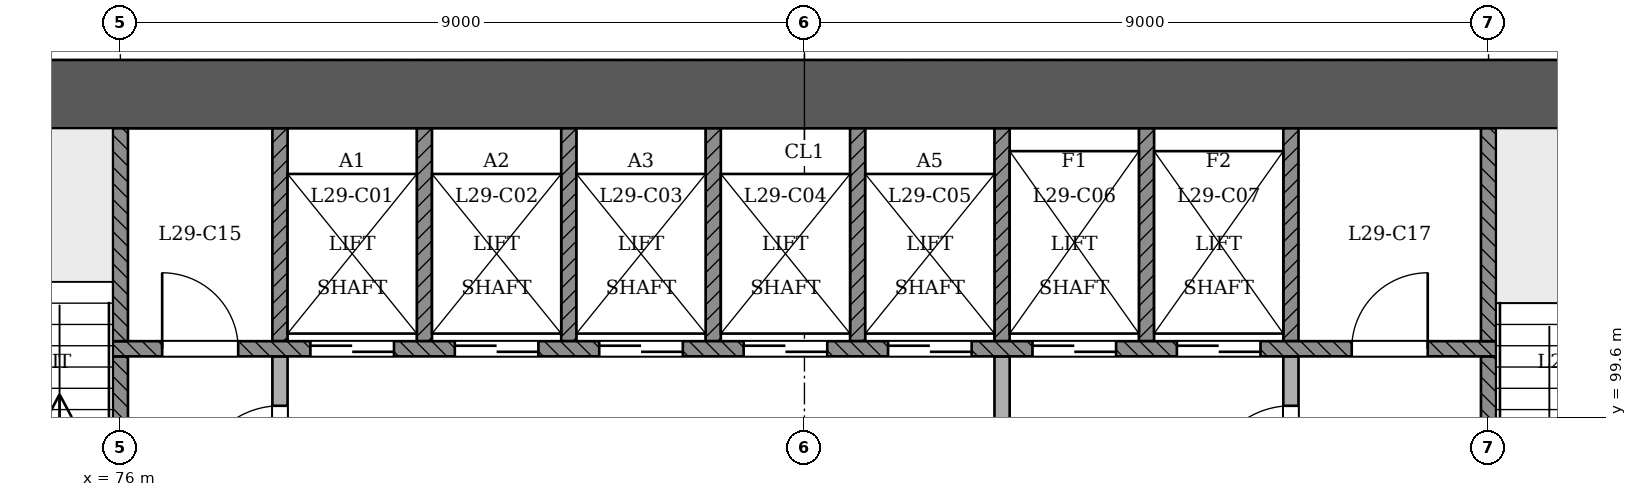
"""IFC4 building model, lengths in metres.
Left out: names, types, materials, properties, quantities, classifications, styles, units other than length and angle.
Written with IfcOpenShell. Run it as: python <this file> out.ifc"""

import sys

from ifc_helpers import new_model, si_unit, direction, frame, frame_2d, origin, place, context, subcontext, project, spatial, rectangle, extrude, element, fill, save


model = new_model("IFC4")
c1 = context("Model", 3, precision=1e-05, world=origin(), true_north=direction((0.0, 1.0)))
c2 = subcontext(c1, "Body", "Model", "MODEL_VIEW")
j1 = project(units=[si_unit("LENGTHUNIT", "METRE"), si_unit("PLANEANGLEUNIT", "RADIAN")], contexts=[c1])
p1 = place(None, origin())
s1 = spatial("IfcSite", under=j1, at=p1, CompositionType="ELEMENT")
p2 = place(p1, origin())
s2 = spatial("IfcBuilding", under=s1, at=p2, CompositionType="ELEMENT")
p3 = place(p2, frame((0.0, 0.0, 115.2)))
s3 = spatial("IfcBuildingStorey", under=s2, at=p3, CompositionType="ELEMENT", Elevation=115.2)
p4 = place(p3, frame((97.45, 103.85, 0.0), z_axis=(0.0, 0.0, 1.0), x_axis=(-1.0, 0.0, 0.0)))
e1 = element("IfcWall", 1, at=p4, inside=s3, PredefinedType="SHEAR", context=c2, shape_type="SweptSolid", body=[
    extrude(rectangle(XDim=25.35, YDim=0.9, at=frame_2d((12.675, 0.0))), origin(), (0.0, 0.0, 1.0), 3.6),
])
p5 = place(p3, frame((87.6, 93.4, 0.0), z_axis=(0.0, 0.0, 1.0), x_axis=(0.0, 1.0, 0.0)))
e2 = element("IfcWall", 2, at=p5, inside=s3, PredefinedType="PARTITIONING", context=c2, shape_type="SweptSolid", body=[
    extrude(rectangle(XDim=7.0, YDim=0.2, at=frame_2d((3.5, 0.0))), origin(), (0.0, 0.0, 1.0), 3.15),
])
p6 = place(p5, frame((4.45, 0.0, 0.0)))
e3 = element("IfcOpeningElement", 3, at=p6, cuts=e2, PredefinedType="OPENING", context=c2, shape_type="SweptSolid", body=[
    extrude(rectangle(XDim=1.1, YDim=2.1, at=frame_2d((0.55, 1.05))), frame((0.0, 0.11, 0.0), z_axis=(0.0, -1.0, 0.0), x_axis=(1.0, 0.0, 0.0)), (0.0, 0.0, 1.0), 0.221),
])
p7 = place(p3, frame((91.4, 96.2, 0.0), z_axis=(0.0, 0.0, 1.0), x_axis=(0.0, 1.0, 0.0)))
e4 = element("IfcWall", 4, at=p7, inside=s3, PredefinedType="PARTITIONING", context=c2, shape_type="SweptSolid", body=[
    extrude(rectangle(XDim=4.2, YDim=0.2, at=frame_2d((2.1, 0.0))), origin(), (0.0, 0.0, 1.0), 3.15),
])
p8 = place(p7, frame((2.45, 0.0, 0.0)))
e5 = element("IfcOpeningElement", 5, at=p8, cuts=e4, PredefinedType="OPENING", context=c2, shape_type="SweptSolid", body=[
    extrude(rectangle(XDim=1.1, YDim=2.1, at=frame_2d((0.55, 1.05))), frame((0.0, 0.11, 0.0), z_axis=(0.0, -1.0, 0.0), x_axis=(1.0, 0.0, 0.0)), (0.0, 0.0, 1.0), 0.221),
])
p9 = place(p3, frame((76.0, 96.7, 0.0), z_axis=(0.0, 0.0, 1.0), x_axis=(0.0, 1.0, 0.0)))
e6 = element("IfcWall", 6, at=p9, inside=s3, PredefinedType="SOLIDWALL", context=c2, shape_type="SweptSolid", body=[
    extrude(rectangle(XDim=3.7, YDim=0.2, at=frame_2d((1.85, 0.0))), origin(), (0.0, 0.0, 1.0), 3.15),
])
p10 = place(p9, frame((0.35, 0.0, 0.0)))
e7 = element("IfcOpeningElement", 7, at=p10, cuts=e6, PredefinedType="OPENING", context=c2, shape_type="SweptSolid", body=[
    extrude(rectangle(XDim=1.1, YDim=2.1, at=frame_2d((0.55, 1.05))), frame((0.0, 0.11, 0.0), z_axis=(0.0, -1.0, 0.0), x_axis=(1.0, 0.0, 0.0)), (0.0, 0.0, 1.0), 0.221),
])
p11 = place(p3, frame((78.1, 96.7, 0.0), z_axis=(0.0, 0.0, 1.0), x_axis=(0.0, 1.0, 0.0)))
e8 = element("IfcWall", 8, at=p11, inside=s3, PredefinedType="PARTITIONING", context=c2, shape_type="SweptSolid", body=[
    extrude(rectangle(XDim=3.7, YDim=0.2, at=frame_2d((1.85, 0.0))), origin(), (0.0, 0.0, 1.0), 3.15),
])
p12 = place(p11, frame((1.95, 0.0, 0.0)))
e9 = element("IfcOpeningElement", 9, at=p12, cuts=e8, PredefinedType="OPENING", context=c2, shape_type="SweptSolid", body=[
    extrude(rectangle(XDim=1.1, YDim=2.1, at=frame_2d((0.55, 1.05))), frame((0.0, 0.11, 0.0), z_axis=(0.0, -1.0, 0.0), x_axis=(1.0, 0.0, 0.0)), (0.0, 0.0, 1.0), 0.221),
])
p13 = place(p3, frame((94.0, 96.7, 0.0), z_axis=(0.0, 0.0, 1.0), x_axis=(0.0, 1.0, 0.0)))
e10 = element("IfcWall", 10, at=p13, inside=s3, PredefinedType="SOLIDWALL", context=c2, shape_type="SweptSolid", body=[
    extrude(rectangle(XDim=3.7, YDim=0.2, at=frame_2d((1.85, 0.0))), origin(), (0.0, 0.0, 1.0), 3.15),
])
p14 = place(p13, frame((0.35, 0.0, 0.0)))
e11 = element("IfcOpeningElement", 11, at=p14, cuts=e10, PredefinedType="OPENING", context=c2, shape_type="SweptSolid", body=[
    extrude(rectangle(XDim=1.1, YDim=2.1, at=frame_2d((0.55, 1.05))), frame((0.0, 0.11, 0.0), z_axis=(0.0, -1.0, 0.0), x_axis=(1.0, 0.0, 0.0)), (0.0, 0.0, 1.0), 0.221),
])
p15 = place(p3, frame((75.9, 100.5, 0.0), z_axis=(0.0, 0.0, 1.0), x_axis=(1.0, 0.0, 0.0)))
e12 = element("IfcWall", 12, at=p15, inside=s3, PredefinedType="SOLIDWALL", context=c2, shape_type="SweptSolid", body=[
    extrude(rectangle(XDim=18.2, YDim=0.2, at=frame_2d((9.1, 0.0))), origin(), (0.0, 0.0, 1.0), 3.15),
])
p16 = place(p15, frame((2.6, 0.0, 0.0)))
e13 = element("IfcOpeningElement", 13, at=p16, cuts=e12, PredefinedType="OPENING", context=c2, shape_type="SweptSolid", body=[
    extrude(rectangle(XDim=1.1, YDim=2.1, at=frame_2d((0.55, 1.05))), frame((0.0, 0.11, 0.0), z_axis=(0.0, -1.0, 0.0), x_axis=(1.0, 0.0, 0.0)), (0.0, 0.0, 1.0), 0.221),
])
p17 = place(p15, frame((4.5, 0.0, 0.0)))
e14 = element("IfcOpeningElement", 14, at=p17, cuts=e12, PredefinedType="OPENING", context=c2, shape_type="SweptSolid", body=[
    extrude(rectangle(XDim=1.1, YDim=2.1, at=frame_2d((0.55, 1.05))), frame((0.0, 0.11, 0.0), z_axis=(0.0, -1.0, 0.0), x_axis=(1.0, 0.0, 0.0)), (0.0, 0.0, 1.0), 0.221),
])
p18 = place(p15, frame((6.4, 0.0, 0.0)))
e15 = element("IfcOpeningElement", 15, at=p18, cuts=e12, PredefinedType="OPENING", context=c2, shape_type="SweptSolid", body=[
    extrude(rectangle(XDim=1.1, YDim=2.1, at=frame_2d((0.55, 1.05))), frame((0.0, 0.11, 0.0), z_axis=(0.0, -1.0, 0.0), x_axis=(1.0, 0.0, 0.0)), (0.0, 0.0, 1.0), 0.221),
])
p19 = place(p15, frame((8.3, 0.0, 0.0)))
e16 = element("IfcOpeningElement", 16, at=p19, cuts=e12, PredefinedType="OPENING", context=c2, shape_type="SweptSolid", body=[
    extrude(rectangle(XDim=1.1, YDim=2.1, at=frame_2d((0.55, 1.05))), frame((0.0, 0.11, 0.0), z_axis=(0.0, -1.0, 0.0), x_axis=(1.0, 0.0, 0.0)), (0.0, 0.0, 1.0), 0.221),
])
p20 = place(p15, frame((10.2, 0.0, 0.0)))
e17 = element("IfcOpeningElement", 17, at=p20, cuts=e12, PredefinedType="OPENING", context=c2, shape_type="SweptSolid", body=[
    extrude(rectangle(XDim=1.1, YDim=2.1, at=frame_2d((0.55, 1.05))), frame((0.0, 0.11, 0.0), z_axis=(0.0, -1.0, 0.0), x_axis=(1.0, 0.0, 0.0)), (0.0, 0.0, 1.0), 0.221),
])
p21 = place(p15, frame((12.1, 0.0, 0.0)))
e18 = element("IfcOpeningElement", 18, at=p21, cuts=e12, PredefinedType="OPENING", context=c2, shape_type="SweptSolid", body=[
    extrude(rectangle(XDim=1.1, YDim=2.1, at=frame_2d((0.55, 1.05))), frame((0.0, 0.11, 0.0), z_axis=(0.0, -1.0, 0.0), x_axis=(1.0, 0.0, 0.0)), (0.0, 0.0, 1.0), 0.221),
])
p22 = place(p15, frame((14.0, 0.0, 0.0)))
e19 = element("IfcOpeningElement", 19, at=p22, cuts=e12, PredefinedType="OPENING", context=c2, shape_type="SweptSolid", body=[
    extrude(rectangle(XDim=1.1, YDim=2.1, at=frame_2d((0.55, 1.05))), frame((0.0, 0.11, 0.0), z_axis=(0.0, -1.0, 0.0), x_axis=(1.0, 0.0, 0.0)), (0.0, 0.0, 1.0), 0.221),
])
p23 = place(p15, frame((0.65, 0.0, 0.0)))
e20 = element("IfcOpeningElement", 20, at=p23, cuts=e12, PredefinedType="OPENING", context=c2, shape_type="SweptSolid", body=[
    extrude(rectangle(XDim=1.0, YDim=2.1, at=frame_2d((0.5, 1.05))), frame((0.0, 0.11, 0.0), z_axis=(0.0, -1.0, 0.0), x_axis=(1.0, 0.0, 0.0)), (0.0, 0.0, 1.0), 0.221),
])
p24 = place(p15, frame((16.3, 0.0, 0.0)))
e21 = element("IfcOpeningElement", 21, at=p24, cuts=e12, PredefinedType="OPENING", context=c2, shape_type="SweptSolid", body=[
    extrude(rectangle(XDim=1.0, YDim=2.1, at=frame_2d((0.5, 1.05))), frame((0.0, 0.11, 0.0), z_axis=(0.0, -1.0, 0.0), x_axis=(1.0, 0.0, 0.0)), (0.0, 0.0, 1.0), 0.221),
])
for number, where, z_axis, x_axis in (
    (22, (76.0, 100.6, 0.0), (0.0, 0.0, 1.0), (0.0, 1.0, 0.0)),
    (23, (78.1, 100.6, 0.0), (0.0, 0.0, 1.0), (0.0, 1.0, 0.0)),
    (24, (80.0, 100.6, 0.0), (0.0, 0.0, 1.0), (0.0, 1.0, 0.0)),
    (25, (81.9, 100.6, 0.0), (0.0, 0.0, 1.0), (0.0, 1.0, 0.0)),
    (26, (83.8, 100.6, 0.0), (0.0, 0.0, 1.0), (0.0, 1.0, 0.0)),
    (27, (85.7, 100.6, 0.0), (0.0, 0.0, 1.0), (0.0, 1.0, 0.0)),
    (28, (87.6, 100.6, 0.0), (0.0, 0.0, 1.0), (0.0, 1.0, 0.0)),
    (29, (89.5, 100.6, 0.0), (0.0, 0.0, 1.0), (0.0, 1.0, 0.0)),
    (30, (91.4, 100.6, 0.0), (0.0, 0.0, 1.0), (0.0, 1.0, 0.0)),
    (31, (94.0, 100.6, 0.0), (0.0, 0.0, 1.0), (0.0, 1.0, 0.0)),
):
    element("IfcWall", number, at=place(p3, frame(where, z_axis=z_axis, x_axis=x_axis)), inside=s3, PredefinedType="SOLIDWALL", context=c2, shape_type="SweptSolid", body=[
        extrude(rectangle(XDim=2.8, YDim=0.2, at=frame_2d((1.4, 0.0))), origin(), (0.0, 0.0, 1.0), 3.15),
    ])
p25 = place(p16, origin())
e32 = element("IfcDoor", 32, at=p25, inside=s3, OperationType="SLIDING_TO_RIGHT", PredefinedType="NOTDEFINED", context=c2, shape_type="SweptSolid", body=[
    extrude(rectangle(XDim=1.1, YDim=2.1, at=frame_2d((0.55, 1.05))), frame((0.0, 0.025, 0.0), z_axis=(0.0, -1.0, 0.0), x_axis=(1.0, 0.0, 0.0)), (0.0, 0.0, 1.0), 0.05),
])
fill(e13, e32)
p26 = place(p17, origin())
e33 = element("IfcDoor", 33, at=p26, inside=s3, OperationType="SLIDING_TO_LEFT", PredefinedType="NOTDEFINED", context=c2, shape_type="SweptSolid", body=[
    extrude(rectangle(XDim=1.1, YDim=2.1, at=frame_2d((0.55, 1.05))), frame((0.0, 0.025, 0.0), z_axis=(0.0, -1.0, 0.0), x_axis=(1.0, 0.0, 0.0)), (0.0, 0.0, 1.0), 0.05),
])
fill(e14, e33)
p27 = place(p18, origin())
e34 = element("IfcDoor", 34, at=p27, inside=s3, OperationType="SLIDING_TO_RIGHT", PredefinedType="NOTDEFINED", context=c2, shape_type="SweptSolid", body=[
    extrude(rectangle(XDim=1.1, YDim=2.1, at=frame_2d((0.55, 1.05))), frame((0.0, 0.025, 0.0), z_axis=(0.0, -1.0, 0.0), x_axis=(1.0, 0.0, 0.0)), (0.0, 0.0, 1.0), 0.05),
])
fill(e15, e34)
p28 = place(p19, origin())
e35 = element("IfcDoor", 35, at=p28, inside=s3, OperationType="SLIDING_TO_LEFT", PredefinedType="NOTDEFINED", context=c2, shape_type="SweptSolid", body=[
    extrude(rectangle(XDim=1.1, YDim=2.1, at=frame_2d((0.55, 1.05))), frame((0.0, 0.025, 0.0), z_axis=(0.0, -1.0, 0.0), x_axis=(1.0, 0.0, 0.0)), (0.0, 0.0, 1.0), 0.05),
])
fill(e16, e35)
p29 = place(p20, origin())
e36 = element("IfcDoor", 36, at=p29, inside=s3, OperationType="SLIDING_TO_RIGHT", PredefinedType="NOTDEFINED", context=c2, shape_type="SweptSolid", body=[
    extrude(rectangle(XDim=1.1, YDim=2.1, at=frame_2d((0.55, 1.05))), frame((0.0, 0.025, 0.0), z_axis=(0.0, -1.0, 0.0), x_axis=(1.0, 0.0, 0.0)), (0.0, 0.0, 1.0), 0.05),
])
fill(e17, e36)
p30 = place(p21, origin())
e37 = element("IfcDoor", 37, at=p30, inside=s3, OperationType="SLIDING_TO_RIGHT", PredefinedType="NOTDEFINED", context=c2, shape_type="SweptSolid", body=[
    extrude(rectangle(XDim=1.1, YDim=2.1, at=frame_2d((0.55, 1.05))), frame((0.0, 0.025, 0.0), z_axis=(0.0, -1.0, 0.0), x_axis=(1.0, 0.0, 0.0)), (0.0, 0.0, 1.0), 0.05),
])
fill(e18, e37)
p31 = place(p22, origin())
e38 = element("IfcDoor", 38, at=p31, inside=s3, OperationType="SLIDING_TO_LEFT", PredefinedType="NOTDEFINED", context=c2, shape_type="SweptSolid", body=[
    extrude(rectangle(XDim=1.1, YDim=2.1, at=frame_2d((0.55, 1.05))), frame((0.0, 0.025, 0.0), z_axis=(0.0, -1.0, 0.0), x_axis=(1.0, 0.0, 0.0)), (0.0, 0.0, 1.0), 0.05),
])
fill(e19, e38)
p32 = place(p12, origin())
e39 = element("IfcDoor", 39, at=p32, inside=s3, OperationType="SINGLE_SWING_LEFT", PredefinedType="NOTDEFINED", context=c2, shape_type="SweptSolid", body=[
    extrude(rectangle(XDim=1.1, YDim=2.1, at=frame_2d((0.55, 1.05))), frame((0.0, 0.025, 0.0), z_axis=(0.0, -1.0, 0.0), x_axis=(1.0, 0.0, 0.0)), (0.0, 0.0, 1.0), 0.05),
])
fill(e9, e39)
p33 = place(p8, origin())
e40 = element("IfcDoor", 40, at=p33, inside=s3, OperationType="SINGLE_SWING_LEFT", PredefinedType="NOTDEFINED", context=c2, shape_type="SweptSolid", body=[
    extrude(rectangle(XDim=1.1, YDim=2.1, at=frame_2d((0.55, 1.05))), frame((0.0, 0.025, 0.0), z_axis=(0.0, -1.0, 0.0), x_axis=(1.0, 0.0, 0.0)), (0.0, 0.0, 1.0), 0.05),
])
fill(e5, e40)
p34 = place(p23, origin())
e41 = element("IfcDoor", 41, at=p34, inside=s3, OperationType="SINGLE_SWING_LEFT", PredefinedType="NOTDEFINED", context=c2, shape_type="SweptSolid", body=[
    extrude(rectangle(XDim=1.0, YDim=2.1, at=frame_2d((0.5, 1.05))), frame((0.0, 0.025, 0.0), z_axis=(0.0, -1.0, 0.0), x_axis=(1.0, 0.0, 0.0)), (0.0, 0.0, 1.0), 0.05),
])
fill(e20, e41)
p35 = place(p24, origin())
e42 = element("IfcDoor", 42, at=p35, inside=s3, OperationType="SINGLE_SWING_RIGHT", PredefinedType="NOTDEFINED", context=c2, shape_type="SweptSolid", body=[
    extrude(rectangle(XDim=1.0, YDim=2.1, at=frame_2d((0.5, 1.05))), frame((0.0, 0.025, 0.0), z_axis=(0.0, -1.0, 0.0), x_axis=(1.0, 0.0, 0.0)), (0.0, 0.0, 1.0), 0.05),
])
fill(e21, e42)
save(model, sys.argv[1])
